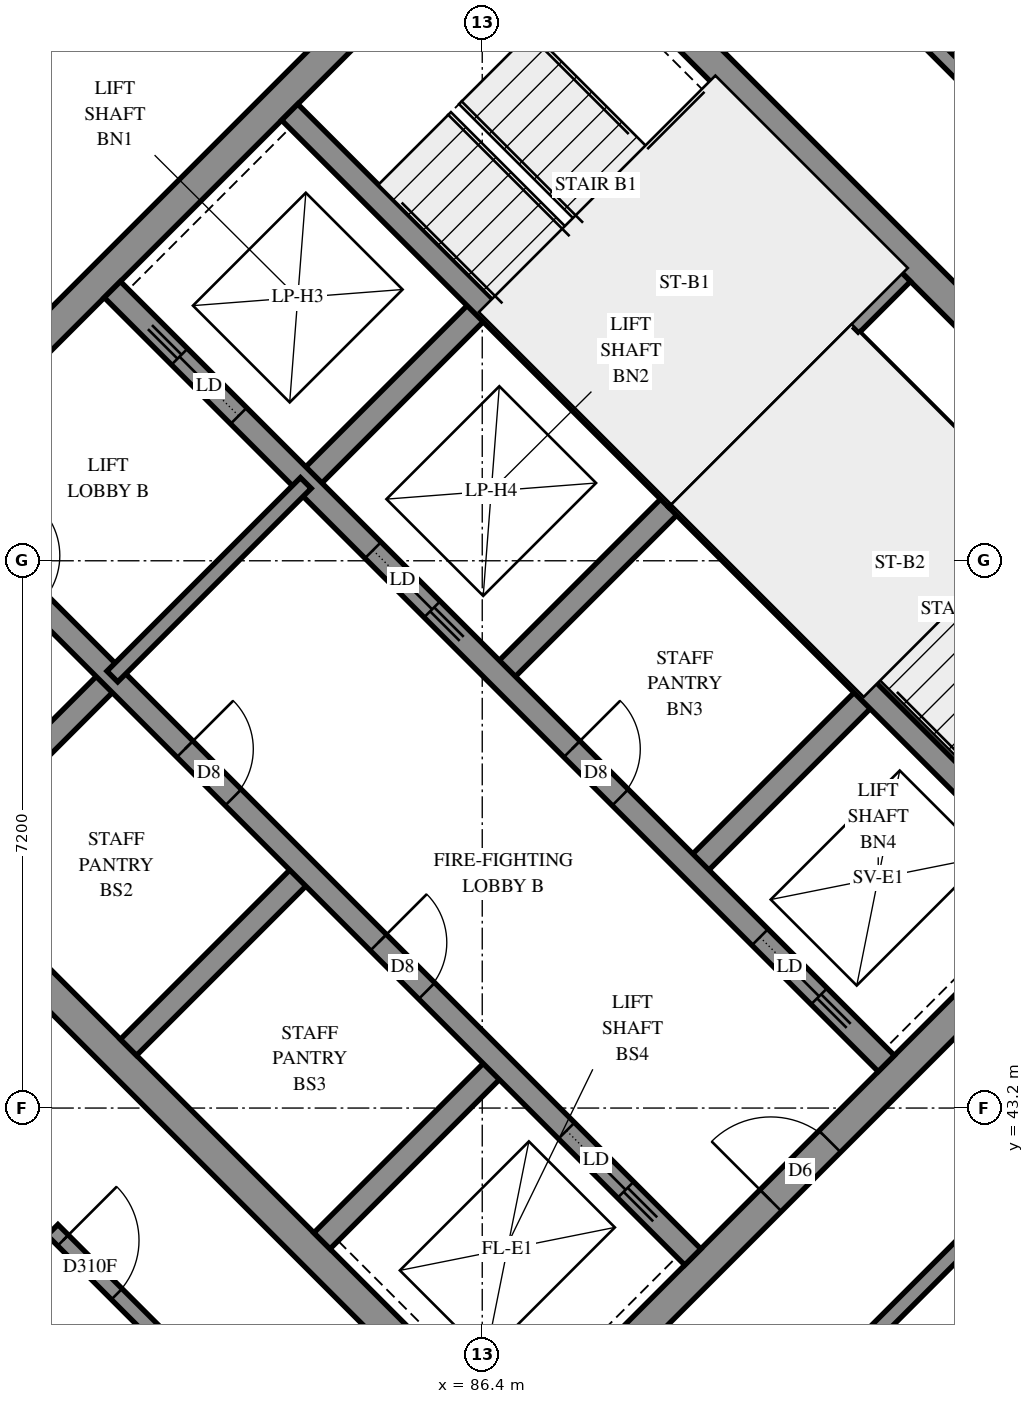
"""IFC4 building model, lengths in metres.
Left out: names, types, materials, properties, quantities, classifications, styles, units other than length and angle.
Written with IfcOpenShell. Run it as: python <this file> out.ifc"""

import sys

from ifc_helpers import new_model, si_unit, direction, frame, frame_2d, origin, place, context, subcontext, project, spatial, rectangle, extrude, element, fill, save


model = new_model("IFC4")
c1 = context("Model", 3, precision=1e-05, world=origin(), true_north=direction((0.0, 1.0)))
c2 = subcontext(c1, "Body", "Model", "MODEL_VIEW")
j1 = project(units=[si_unit("LENGTHUNIT", "METRE"), si_unit("PLANEANGLEUNIT", "RADIAN")], contexts=[c1])
p1 = place(None, origin())
s1 = spatial("IfcSite", under=j1, at=p1, CompositionType="ELEMENT")
p2 = place(p1, origin())
s2 = spatial("IfcBuilding", under=s1, at=p2, CompositionType="ELEMENT")
p3 = place(p2, frame((0.0, 0.0, 257.4)))
s3 = spatial("IfcBuildingStorey", under=s2, at=p3, CompositionType="ELEMENT", Elevation=257.4)
p4 = place(p3, frame((76.23, 49.231, -0.3), z_axis=(0.0, 0.0, 1.0), x_axis=(0.7071034917, -0.7071100706, 0.0)))
e1 = element("IfcWall", 1, at=p4, inside=s3, PredefinedType="SHEAR", context=c2, shape_type="SweptSolid", body=[
    extrude(rectangle(XDim=15.2, YDim=0.4, at=frame_2d((7.6, 0.0))), origin(), (0.0, 0.0, 1.0), 2.7),
])
p5 = place(p3, frame((86.695, 59.696, -0.3), z_axis=(0.0, 0.0, 1.0), x_axis=(0.7071100706, -0.7071034917, 0.0)))
e2 = element("IfcWall", 2, at=p5, inside=s3, PredefinedType="SHEAR", context=c2, shape_type="SweptSolid", body=[
    extrude(rectangle(XDim=15.2, YDim=0.4, at=frame_2d((7.6, 0.0))), origin(), (0.0, 0.0, 1.0), 2.7),
])
p6 = place(p5, frame((10.4, 0.0, 0.3)))
e3 = element("IfcOpeningElement", 3, at=p6, cuts=e2, PredefinedType="OPENING", context=c2, shape_type="SweptSolid", body=[
    extrude(rectangle(XDim=0.8, YDim=2.1, at=frame_2d((0.4, 1.05))), frame((0.0, 0.21, 0.0), z_axis=(0.0, -1.0, 0.0), x_axis=(1.0, 0.0, 0.0)), (0.0, 0.0, 1.0), 0.42),
])
p7 = place(p3, frame((76.513, 49.231, -0.3), z_axis=(0.0, 0.0, 1.0), x_axis=(0.7071067812, 0.7071067812, 0.0)))
e4 = element("IfcWall", 4, at=p7, inside=s3, PredefinedType="SHEAR", context=c2, shape_type="SweptSolid", body=[
    extrude(rectangle(XDim=14.4, YDim=0.4, at=frame_2d((7.2, 0.0))), origin(), (0.0, 0.0, 1.0), 2.7),
])
p8 = place(p7, frame((4.55, 0.0, 0.3)))
e5 = element("IfcOpeningElement", 5, at=p8, cuts=e4, PredefinedType="OPENING", context=c2, shape_type="SweptSolid", body=[
    extrude(rectangle(XDim=1.1, YDim=2.1, at=frame_2d((0.55, 1.05))), frame((0.0, 0.21, 0.0), z_axis=(0.0, -1.0, 0.0), x_axis=(1.0, 0.0, 0.0)), (0.0, 0.0, 1.0), 0.42),
])
p9 = place(p7, frame((11.35, 0.0, 0.3)))
e6 = element("IfcOpeningElement", 6, at=p9, cuts=e4, PredefinedType="OPENING", context=c2, shape_type="SweptSolid", body=[
    extrude(rectangle(XDim=1.1, YDim=2.1, at=frame_2d((0.55, 1.05))), frame((0.0, 0.21, 0.0), z_axis=(0.0, -1.0, 0.0), x_axis=(1.0, 0.0, 0.0)), (0.0, 0.0, 1.0), 0.42),
])
p10 = place(p3, frame((86.978, 38.766, -0.3), z_axis=(0.0, 0.0, 1.0), x_axis=(0.7071067812, 0.7071067812, 0.0)))
e7 = element("IfcWall", 7, at=p10, inside=s3, PredefinedType="SHEAR", context=c2, shape_type="SweptSolid", body=[
    extrude(rectangle(XDim=14.4, YDim=0.4, at=frame_2d((7.2, 0.0))), origin(), (0.0, 0.0, 1.0), 2.7),
])
p11 = place(p10, frame((4.55, 0.0, 0.3)))
e8 = element("IfcOpeningElement", 8, at=p11, cuts=e7, PredefinedType="OPENING", context=c2, shape_type="SweptSolid", body=[
    extrude(rectangle(XDim=1.1, YDim=2.1, at=frame_2d((0.55, 1.05))), frame((0.0, 0.21, 0.0), z_axis=(0.0, -1.0, 0.0), x_axis=(1.0, 0.0, 0.0)), (0.0, 0.0, 1.0), 0.42),
])
p12 = place(p10, frame((11.35, 0.0, 0.3)))
e9 = element("IfcOpeningElement", 9, at=p12, cuts=e7, PredefinedType="OPENING", context=c2, shape_type="SweptSolid", body=[
    extrude(rectangle(XDim=1.1, YDim=2.1, at=frame_2d((0.55, 1.05))), frame((0.0, 0.21, 0.0), z_axis=(0.0, -1.0, 0.0), x_axis=(1.0, 0.0, 0.0)), (0.0, 0.0, 1.0), 0.42),
])
for number, where, z_axis, x_axis in (
    (10, (79.2, 46.544, 0.0), (0.0, 0.0, 1.0), (0.707, 0.707, 0.0)),
    (11, (84.079, 51.423, 0.0), (0.0, 0.0, 1.0), (0.707, 0.707, 0.0)),
):
    element("IfcWall", number, at=place(p3, frame(where, z_axis=z_axis, x_axis=x_axis)), inside=s3, PredefinedType="SOLIDWALL", context=c2, shape_type="SweptSolid", body=[
        extrude(rectangle(XDim=3.3, YDim=0.3, at=frame_2d((1.65, 0.0))), origin(), (0.0, 0.0, 1.0), 3.1),
    ])
p13 = place(p3, frame((81.746, 43.999, 0.0), z_axis=(0.0, 0.0, 1.0), x_axis=(0.7071067812, 0.7071067812, 0.0)))
e12 = element("IfcWall", 12, at=p13, inside=s3, PredefinedType="SOLIDWALL", context=c2, shape_type="SweptSolid", body=[
    extrude(rectangle(XDim=3.3, YDim=0.3, at=frame_2d((1.65, 0.0))), origin(), (0.0, 0.0, 1.0), 3.1),
])
p14 = place(p3, frame((86.625, 48.878, 0.0), z_axis=(0.0, 0.0, 1.0), x_axis=(0.7071067812, 0.7071067812, 0.0)))
e13 = element("IfcWall", 13, at=p14, inside=s3, PredefinedType="SOLIDWALL", context=c2, shape_type="SweptSolid", body=[
    extrude(rectangle(XDim=3.3, YDim=0.3, at=frame_2d((1.65, 0.0))), origin(), (0.0, 0.0, 1.0), 3.1),
])
p15 = place(p3, frame((84.291, 41.453, 0.0), z_axis=(0.0, 0.0, 1.0), x_axis=(0.7071067812, 0.7071067812, 0.0)))
e14 = element("IfcWall", 14, at=p15, inside=s3, PredefinedType="SOLIDWALL", context=c2, shape_type="SweptSolid", body=[
    extrude(rectangle(XDim=3.3, YDim=0.3, at=frame_2d((1.65, 0.0))), origin(), (0.0, 0.0, 1.0), 3.1),
])
p16 = place(p3, frame((89.17, 46.332, 0.0), z_axis=(0.0, 0.0, 1.0), x_axis=(0.7071067812, 0.7071067812, 0.0)))
e15 = element("IfcWall", 15, at=p16, inside=s3, PredefinedType="SOLIDWALL", context=c2, shape_type="SweptSolid", body=[
    extrude(rectangle(XDim=3.3, YDim=0.3, at=frame_2d((1.65, 0.0))), origin(), (0.0, 0.0, 1.0), 3.1),
])
p17 = place(p3, frame((78.988, 51.423, 0.0), z_axis=(0.0, 0.0, 1.0), x_axis=(0.7071067812, -0.7071067812, 0.0)))
e16 = element("IfcWall", 16, at=p17, inside=s3, PredefinedType="SOLIDWALL", context=c2, shape_type="SweptSolid", body=[
    extrude(rectangle(XDim=14.4, YDim=0.3, at=frame_2d((7.2, 0.0))), origin(), (0.0, 0.0, 1.0), 3.1),
])
p18 = place(p17, frame((1.35, 0.0, 0.0)))
e17 = element("IfcOpeningElement", 17, at=p18, cuts=e16, PredefinedType="OPENING", context=c2, shape_type="SweptSolid", body=[
    extrude(rectangle(XDim=0.9, YDim=2.1, at=frame_2d((0.45, 1.05))), frame((0.0, 0.16, 0.0), z_axis=(0.0, -1.0, 0.0), x_axis=(1.0, 0.0, 0.0)), (0.0, 0.0, 1.0), 0.32),
])
p19 = place(p17, frame((4.95, 0.0, 0.0)))
e18 = element("IfcOpeningElement", 18, at=p19, cuts=e16, PredefinedType="OPENING", context=c2, shape_type="SweptSolid", body=[
    extrude(rectangle(XDim=0.9, YDim=2.1, at=frame_2d((0.45, 1.05))), frame((0.0, 0.16, 0.0), z_axis=(0.0, -1.0, 0.0), x_axis=(1.0, 0.0, 0.0)), (0.0, 0.0, 1.0), 0.32),
])
p20 = place(p17, frame((8.55, 0.0, 0.0)))
e19 = element("IfcOpeningElement", 19, at=p20, cuts=e16, PredefinedType="OPENING", context=c2, shape_type="SweptSolid", body=[
    extrude(rectangle(XDim=0.9, YDim=2.1, at=frame_2d((0.45, 1.05))), frame((0.0, 0.16, 0.0), z_axis=(0.0, -1.0, 0.0), x_axis=(1.0, 0.0, 0.0)), (0.0, 0.0, 1.0), 0.32),
])
p21 = place(p17, frame((12.05, 0.0, 0.0)))
e20 = element("IfcOpeningElement", 20, at=p21, cuts=e16, PredefinedType="OPENING", context=c2, shape_type="SweptSolid", body=[
    extrude(rectangle(XDim=1.1, YDim=2.1, at=frame_2d((0.55, 1.05))), frame((0.0, 0.16, 0.0), z_axis=(0.0, -1.0, 0.0), x_axis=(1.0, 0.0, 0.0)), (0.0, 0.0, 1.0), 0.32),
])
p22 = place(p3, frame((81.534, 53.969, 0.0), z_axis=(0.0, 0.0, 1.0), x_axis=(0.707103309, -0.7071102534, 0.0)))
e21 = element("IfcWall", 21, at=p22, inside=s3, PredefinedType="SOLIDWALL", context=c2, shape_type="SweptSolid", body=[
    extrude(rectangle(XDim=14.4, YDim=0.3, at=frame_2d((7.2, 0.0))), origin(), (0.0, 0.0, 1.0), 3.1),
])
p23 = place(p22, frame((8.55, 0.0, 0.0)))
e22 = element("IfcOpeningElement", 22, at=p23, cuts=e21, PredefinedType="OPENING", context=c2, shape_type="SweptSolid", body=[
    extrude(rectangle(XDim=0.9, YDim=2.1, at=frame_2d((0.45, 1.05))), frame((0.0, 0.16, 0.0), z_axis=(0.0, -1.0, 0.0), x_axis=(1.0, 0.0, 0.0)), (0.0, 0.0, 1.0), 0.32),
])
p24 = place(p22, frame((1.25, 0.0, 0.0)))
e23 = element("IfcOpeningElement", 23, at=p24, cuts=e21, PredefinedType="OPENING", context=c2, shape_type="SweptSolid", body=[
    extrude(rectangle(XDim=1.1, YDim=2.1, at=frame_2d((0.55, 1.05))), frame((0.0, 0.16, 0.0), z_axis=(0.0, -1.0, 0.0), x_axis=(1.0, 0.0, 0.0)), (0.0, 0.0, 1.0), 0.32),
])
p25 = place(p22, frame((4.85, 0.0, 0.0)))
e24 = element("IfcOpeningElement", 24, at=p25, cuts=e21, PredefinedType="OPENING", context=c2, shape_type="SweptSolid", body=[
    extrude(rectangle(XDim=1.1, YDim=2.1, at=frame_2d((0.55, 1.05))), frame((0.0, 0.16, 0.0), z_axis=(0.0, -1.0, 0.0), x_axis=(1.0, 0.0, 0.0)), (0.0, 0.0, 1.0), 0.32),
])
p26 = place(p22, frame((12.05, 0.0, 0.0)))
e25 = element("IfcOpeningElement", 25, at=p26, cuts=e21, PredefinedType="OPENING", context=c2, shape_type="SweptSolid", body=[
    extrude(rectangle(XDim=1.1, YDim=2.1, at=frame_2d((0.55, 1.05))), frame((0.0, 0.16, 0.0), z_axis=(0.0, -1.0, 0.0), x_axis=(1.0, 0.0, 0.0)), (0.0, 0.0, 1.0), 0.32),
])
for number, where, z_axis, x_axis in (
    (26, (83.867, 56.302, 0.0), (0.0, 0.0, 1.0), (0.707, -0.707, 0.0)),
    (27, (88.958, 51.211, 0.0), (0.0, 0.0, 1.0), (0.707, -0.707, 0.0)),
):
    element("IfcWall", number, at=place(p3, frame(where, z_axis=z_axis, x_axis=x_axis)), inside=s3, PredefinedType="SOLIDWALL", context=c2, shape_type="SweptSolid", body=[
        extrude(rectangle(XDim=7.2, YDim=0.3, at=frame_2d((3.6, 0.0))), origin(), (0.0, 0.0, 1.0), 3.1),
    ])
p27 = place(p3, frame((88.958, 51.211, 0.0), z_axis=(0.0, 0.0, 1.0), x_axis=(0.7071067812, 0.7071067812, 0.0)))
e28 = element("IfcWall", 28, at=p27, inside=s3, PredefinedType="SOLIDWALL", context=c2, shape_type="SweptSolid", body=[
    extrude(rectangle(XDim=4.2, YDim=0.3, at=frame_2d((2.1, 0.0))), origin(), (0.0, 0.0, 1.0), 3.1),
])
p28 = place(p3, frame((91.313, 53.354, 0.0), z_axis=(0.0, 0.0, 1.0), x_axis=(0.7071140275, -0.7070995348, 0.0)))
e29 = element("IfcWall", 29, at=p28, inside=s3, PredefinedType="PARTITIONING", context=c2, shape_type="SweptSolid", body=[
    extrude(rectangle(XDim=6.9, YDim=0.15, at=frame_2d((3.45, 0.0))), origin(), (0.0, 0.0, 1.0), 3.1),
])
p29 = place(p3, frame((81.534, 48.878, 0.0), z_axis=(0.0, 0.0, 1.0), x_axis=(0.707092892, 0.7071206701, 0.0)))
e30 = element("IfcWall", 30, at=p29, inside=s3, PredefinedType="PARTITIONING", context=c2, shape_type="SweptSolid", body=[
    extrude(rectangle(XDim=3.6, YDim=0.2, at=frame_2d((1.8, 0.0))), origin(), (0.0, 0.0, 1.0), 3.1),
])
p30 = place(p3, frame((84.949, 31.932, 0.0), z_axis=(0.0, 0.0, 1.0), x_axis=(0.7071768688, 0.7070366866, 0.0)))
e31 = element("IfcWall", 31, at=p30, inside=s3, PredefinedType="PARTITIONING", context=c2, shape_type="SweptSolid", body=[
    extrude(rectangle(XDim=14.267, YDim=0.2, at=frame_2d((7.134, 0.0))), origin(), (0.0, 0.0, 1.0), 3.1),
])
p31 = place(p3, frame((86.836, 35.514, 0.0), z_axis=(0.0, 0.0, 1.0), x_axis=(0.7071067812, 0.7071067812, 0.0)))
e32 = element("IfcWall", 32, at=p31, inside=s3, PredefinedType="PARTITIONING", context=c2, shape_type="SweptSolid", body=[
    extrude(rectangle(XDim=10.4, YDim=0.2, at=frame_2d((5.2, 0.0))), origin(), (0.0, 0.0, 1.0), 3.1),
])
p32 = place(p31, frame((9.207, 0.0, 0.0)))
e33 = element("IfcOpeningElement", 33, at=p32, cuts=e32, PredefinedType="OPENING", context=c2, shape_type="SweptSolid", body=[
    extrude(rectangle(XDim=1.0, YDim=2.1, at=frame_2d((0.5, 1.05))), frame((0.0, 0.11, 0.0), z_axis=(0.0, -1.0, 0.0), x_axis=(1.0, 0.0, 0.0)), (0.0, 0.0, 1.0), 0.22),
])
p33 = place(p3, frame((80.747, 41.597, 0.0), z_axis=(0.0, 0.0, 1.0), x_axis=(0.7071067812, -0.7071067812, 0.0)))
e34 = element("IfcWall", 34, at=p33, inside=s3, PredefinedType="PARTITIONING", context=c2, shape_type="SweptSolid", body=[
    extrude(rectangle(XDim=8.607, YDim=0.2, at=frame_2d((4.303, 0.0))), origin(), (0.0, 0.0, 1.0), 3.1),
])
p34 = place(p33, frame((0.195, 0.0, 0.0)))
e35 = element("IfcOpeningElement", 35, at=p34, cuts=e34, PredefinedType="OPENING", context=c2, shape_type="SweptSolid", body=[
    extrude(rectangle(XDim=1.0, YDim=2.1, at=frame_2d((0.5, 1.05))), frame((0.0, 0.11, 0.0), z_axis=(0.0, -1.0, 0.0), x_axis=(1.0, 0.0, 0.0)), (0.0, 0.0, 1.0), 0.22),
])
p35 = place(p33, frame((3.133, 0.0, 0.0)))
e36 = element("IfcOpeningElement", 36, at=p35, cuts=e34, PredefinedType="OPENING", context=c2, shape_type="SweptSolid", body=[
    extrude(rectangle(XDim=1.0, YDim=2.1, at=frame_2d((0.5, 1.05))), frame((0.0, 0.11, 0.0), z_axis=(0.0, -1.0, 0.0), x_axis=(1.0, 0.0, 0.0)), (0.0, 0.0, 1.0), 0.22),
])
p36 = place(p3, frame((88.537, 60.973, 0.0), z_axis=(0.0, 0.0, 1.0), x_axis=(0.7071067812, -0.7071067812, 0.0)))
e37 = element("IfcWall", 37, at=p36, inside=s3, PredefinedType="PARTITIONING", context=c2, shape_type="SweptSolid", body=[
    extrude(rectangle(XDim=6.401, YDim=0.2, at=frame_2d((3.2, 0.0))), origin(), (0.0, 0.0, 1.0), 3.1),
])
p37 = place(p36, frame((0.569, 0.0, 0.0)))
e38 = element("IfcOpeningElement", 38, at=p37, cuts=e37, PredefinedType="OPENING", context=c2, shape_type="SweptSolid", body=[
    extrude(rectangle(XDim=0.9, YDim=2.1, at=frame_2d((0.45, 1.05))), frame((0.0, 0.11, 0.0), z_axis=(0.0, -1.0, 0.0), x_axis=(1.0, 0.0, 0.0)), (0.0, 0.0, 1.0), 0.22),
])
p38 = place(p11, origin())
e39 = element("IfcDoor", 39, at=p38, inside=s3, OperationType="DOUBLE_DOOR_SINGLE_SWING", PredefinedType="DOOR", context=c2, shape_type="SweptSolid", body=[
    extrude(rectangle(XDim=1.1, YDim=2.1, at=frame_2d((0.55, 1.05))), frame((0.0, 0.025, 0.0), z_axis=(0.0, -1.0, 0.0), x_axis=(1.0, 0.0, 0.0)), (0.0, 0.0, 1.0), 0.05),
])
fill(e8, e39)
p39 = place(p19, origin())
e40 = element("IfcDoor", 40, at=p39, inside=s3, OperationType="SINGLE_SWING_LEFT", PredefinedType="DOOR", context=c2, shape_type="SweptSolid", body=[
    extrude(rectangle(XDim=0.9, YDim=2.1, at=frame_2d((0.45, 1.05))), frame((0.0, 0.025, 0.0), z_axis=(0.0, -1.0, 0.0), x_axis=(1.0, 0.0, 0.0)), (0.0, 0.0, 1.0), 0.05),
])
fill(e18, e40)
p40 = place(p20, origin())
e41 = element("IfcDoor", 41, at=p40, inside=s3, OperationType="SINGLE_SWING_LEFT", PredefinedType="DOOR", context=c2, shape_type="SweptSolid", body=[
    extrude(rectangle(XDim=0.9, YDim=2.1, at=frame_2d((0.45, 1.05))), frame((0.0, 0.025, 0.0), z_axis=(0.0, -1.0, 0.0), x_axis=(1.0, 0.0, 0.0)), (0.0, 0.0, 1.0), 0.05),
])
fill(e19, e41)
p41 = place(p23, origin())
e42 = element("IfcDoor", 42, at=p41, inside=s3, OperationType="SINGLE_SWING_LEFT", PredefinedType="DOOR", context=c2, shape_type="SweptSolid", body=[
    extrude(rectangle(XDim=0.9, YDim=2.1, at=frame_2d((0.45, 1.05))), frame((0.0, 0.025, 0.0), z_axis=(0.0, -1.0, 0.0), x_axis=(1.0, 0.0, 0.0)), (0.0, 0.0, 1.0), 0.05),
])
fill(e22, e42)
p42 = place(p21, origin())
e43 = element("IfcDoor", 43, at=p42, inside=s3, OperationType="SLIDING_TO_RIGHT", PredefinedType="DOOR", context=c2, shape_type="SweptSolid", body=[
    extrude(rectangle(XDim=1.1, YDim=2.1, at=frame_2d((0.55, 1.05))), frame((0.0, 0.025, 0.0), z_axis=(0.0, -1.0, 0.0), x_axis=(1.0, 0.0, 0.0)), (0.0, 0.0, 1.0), 0.05),
])
fill(e20, e43)
p43 = place(p24, origin())
e44 = element("IfcDoor", 44, at=p43, inside=s3, OperationType="SLIDING_TO_LEFT", PredefinedType="DOOR", context=c2, shape_type="SweptSolid", body=[
    extrude(rectangle(XDim=1.1, YDim=2.1, at=frame_2d((0.55, 1.05))), frame((0.0, 0.025, 0.0), z_axis=(0.0, -1.0, 0.0), x_axis=(1.0, 0.0, 0.0)), (0.0, 0.0, 1.0), 0.05),
])
fill(e23, e44)
p44 = place(p25, origin())
e45 = element("IfcDoor", 45, at=p44, inside=s3, OperationType="SLIDING_TO_RIGHT", PredefinedType="DOOR", context=c2, shape_type="SweptSolid", body=[
    extrude(rectangle(XDim=1.1, YDim=2.1, at=frame_2d((0.55, 1.05))), frame((0.0, 0.025, 0.0), z_axis=(0.0, -1.0, 0.0), x_axis=(1.0, 0.0, 0.0)), (0.0, 0.0, 1.0), 0.05),
])
fill(e24, e45)
p45 = place(p26, origin())
e46 = element("IfcDoor", 46, at=p45, inside=s3, OperationType="SLIDING_TO_RIGHT", PredefinedType="DOOR", context=c2, shape_type="SweptSolid", body=[
    extrude(rectangle(XDim=1.1, YDim=2.1, at=frame_2d((0.55, 1.05))), frame((0.0, 0.025, 0.0), z_axis=(0.0, -1.0, 0.0), x_axis=(1.0, 0.0, 0.0)), (0.0, 0.0, 1.0), 0.05),
])
fill(e25, e46)
p46 = place(p34, origin())
e47 = element("IfcDoor", 47, at=p46, inside=s3, OperationType="SINGLE_SWING_LEFT", PredefinedType="DOOR", context=c2, shape_type="SweptSolid", body=[
    extrude(rectangle(XDim=1.0, YDim=2.1, at=frame_2d((0.5, 1.05))), frame((0.0, 0.025, 0.0), z_axis=(0.0, -1.0, 0.0), x_axis=(1.0, 0.0, 0.0)), (0.0, 0.0, 1.0), 0.05),
])
fill(e35, e47)
save(model, sys.argv[1])
